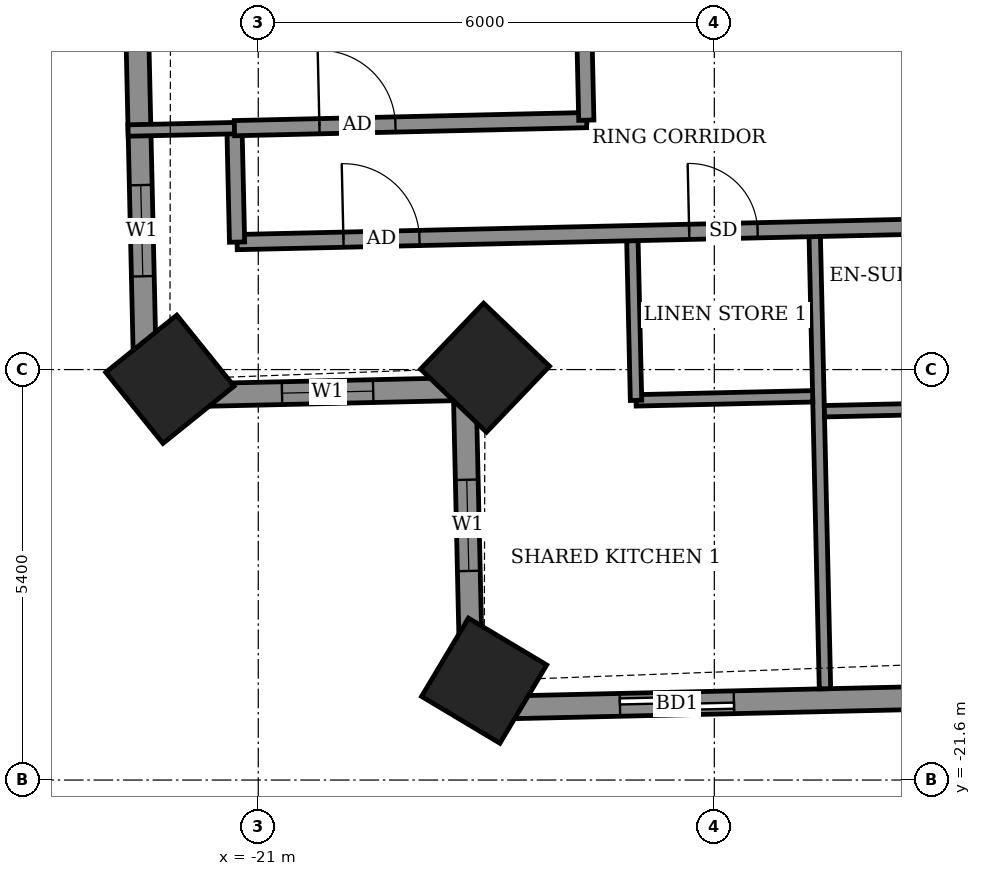
"""IFC4 building model, lengths in metres.
Left out: names, types, materials, properties, quantities, classifications, styles, units other than length and angle.
Written with IfcOpenShell. Run it as: python <this file> out.ifc"""

import sys

from ifc_helpers import new_model, si_unit, direction, frame, frame_2d, origin, origin_2d, place, context, subcontext, project, spatial, rectangle, extrude, element, fill, save


model = new_model("IFC4")
c1 = context("Model", 3, precision=1e-05, world=origin(), true_north=direction((0.0, 1.0)))
c2 = subcontext(c1, "Body", "Model", "MODEL_VIEW")
j1 = project(units=[si_unit("LENGTHUNIT", "METRE"), si_unit("PLANEANGLEUNIT", "RADIAN")], contexts=[c1])
p1 = place(None, origin())
s1 = spatial("IfcSite", under=j1, at=p1, CompositionType="ELEMENT")
p2 = place(p1, origin())
s2 = spatial("IfcBuilding", under=s1, at=p2, CompositionType="ELEMENT")
p3 = place(p2, frame((0.0, 0.0, 186.1)))
s3 = spatial("IfcBuildingStorey", under=s2, at=p3, CompositionType="ELEMENT", Elevation=186.1)
for number, where, z_axis, x_axis in (
    (1, (-22.163, -16.328, -0.55), (0.0, 0.0, 1.0), (0.627, -0.779, 0.0)),
    (2, (-18.016, -16.175, -0.55), (0.0, 0.0, 1.0), (0.723, -0.691, 0.0)),
    (3, (-18.028, -20.293, -0.55), (0.0, 0.0, 1.0), (0.858, -0.513, 0.0)),
):
    element("IfcColumn", number, at=place(p3, frame(where, z_axis=z_axis, x_axis=x_axis)), inside=s3, PredefinedType="COLUMN", context=c2, shape_type="SweptSolid", body=[
        extrude(rectangle(XDim=1.2, YDim=1.2, at=origin_2d()), origin(), (0.0, 0.0, 1.0), 3.6),
    ])
p4 = place(p3, frame((-22.729, -5.725, 0.0), z_axis=(0.0, 0.0, 1.0), x_axis=(0.022726014582, -0.999741730779, 0.0)))
e4 = element("IfcWall", 4, at=p4, inside=s3, PredefinedType="SOLIDWALL", context=c2, shape_type="SweptSolid", body=[
    extrude(rectangle(XDim=10.829, YDim=0.3, at=frame_2d((5.414, 0.0))), origin(), (0.0, 0.0, 1.0), 3.05),
])
p5 = place(p4, frame((1.592, 0.0, 0.0)))
e5 = element("IfcOpeningElement", 5, at=p5, cuts=e4, PredefinedType="OPENING", context=c2, shape_type="SweptSolid", body=[
    extrude(rectangle(XDim=1.5, YDim=2.4, at=frame_2d((0.75, 1.2))), frame((0.0, 0.16, 0.0), z_axis=(0.0, -1.0, 0.0), x_axis=(1.0, 0.0, 0.0)), (0.0, 0.0, 1.0), 0.32),
])
p6 = place(p4, frame((8.05, 0.0, 0.9)))
e6 = element("IfcOpeningElement", 6, at=p6, cuts=e4, PredefinedType="OPENING", context=c2, shape_type="SweptSolid", body=[
    extrude(rectangle(XDim=1.2, YDim=1.5, at=frame_2d((0.6, 0.75))), frame((0.0, 0.16, 0.0), z_axis=(0.0, -1.0, 0.0), x_axis=(1.0, 0.0, 0.0)), (0.0, 0.0, 1.0), 0.32),
])
p7 = place(p3, frame((-22.483, -16.551, 0.0), z_axis=(0.0, 0.0, 1.0), x_axis=(0.999744320311, 0.022611811187, 0.0)))
e7 = element("IfcWall", 7, at=p7, inside=s3, PredefinedType="SOLIDWALL", context=c2, shape_type="SweptSolid", body=[
    extrude(rectangle(XDim=4.2, YDim=0.3, at=frame_2d((2.1, 0.0))), origin(), (0.0, 0.0, 1.0), 2.55),
])
p8 = place(p7, frame((1.796, 0.0, 0.9)))
e8 = element("IfcOpeningElement", 8, at=p8, cuts=e7, PredefinedType="OPENING", context=c2, shape_type="SweptSolid", body=[
    extrude(rectangle(XDim=1.2, YDim=1.5, at=frame_2d((0.6, 0.75))), frame((0.0, 0.16, 0.0), z_axis=(0.0, -1.0, 0.0), x_axis=(1.0, 0.0, 0.0)), (0.0, 0.0, 1.0), 0.32),
])
p9 = place(p3, frame((-18.284, -16.456, 0.0), z_axis=(0.0, 0.0, 1.0), x_axis=(0.022611811187, -0.999744320311, 0.0)))
e9 = element("IfcWall", 9, at=p9, inside=s3, PredefinedType="SOLIDWALL", context=c2, shape_type="SweptSolid", body=[
    extrude(rectangle(XDim=4.2, YDim=0.3, at=frame_2d((2.1, 0.0))), origin(), (0.0, 0.0, 1.0), 2.55),
])
p10 = place(p9, frame((1.194, 0.0, 0.9)))
e10 = element("IfcOpeningElement", 10, at=p10, cuts=e9, PredefinedType="OPENING", context=c2, shape_type="SweptSolid", body=[
    extrude(rectangle(XDim=1.2, YDim=1.5, at=frame_2d((0.6, 0.75))), frame((0.0, 0.16, 0.0), z_axis=(0.0, -1.0, 0.0), x_axis=(1.0, 0.0, 0.0)), (0.0, 0.0, 1.0), 0.32),
])
p11 = place(p3, frame((-18.189, -20.655, 0.0), z_axis=(0.0, 0.0, 1.0), x_axis=(0.999742285265, 0.022701609063, 0.0)))
e11 = element("IfcWall", 11, at=p11, inside=s3, PredefinedType="SOLIDWALL", context=c2, shape_type="SweptSolid", body=[
    extrude(rectangle(XDim=39.78, YDim=0.3, at=frame_2d((19.89, 0.0))), origin(), (0.0, 0.0, 1.0), 3.05),
])
p12 = place(p11, frame((1.948, 0.0, 0.0)))
e12 = element("IfcOpeningElement", 12, at=p12, cuts=e11, PredefinedType="OPENING", context=c2, shape_type="SweptSolid", body=[
    extrude(rectangle(XDim=1.5, YDim=2.4, at=frame_2d((0.75, 1.2))), frame((0.0, 0.16, 0.0), z_axis=(0.0, -1.0, 0.0), x_axis=(1.0, 0.0, 0.0)), (0.0, 0.0, 1.0), 0.32),
])
p13 = place(p11, frame((7.24, 0.0, 0.0)))
e13 = element("IfcOpeningElement", 13, at=p13, cuts=e11, PredefinedType="OPENING", context=c2, shape_type="SweptSolid", body=[
    extrude(rectangle(XDim=1.5, YDim=2.4, at=frame_2d((0.75, 1.2))), frame((0.0, 0.16, 0.0), z_axis=(0.0, -1.0, 0.0), x_axis=(1.0, 0.0, 0.0)), (0.0, 0.0, 1.0), 0.32),
])
p14 = place(p11, frame((10.23, 0.0, 0.0)))
e14 = element("IfcOpeningElement", 14, at=p14, cuts=e11, PredefinedType="OPENING", context=c2, shape_type="SweptSolid", body=[
    extrude(rectangle(XDim=1.5, YDim=2.4, at=frame_2d((0.75, 1.2))), frame((0.0, 0.16, 0.0), z_axis=(0.0, -1.0, 0.0), x_axis=(1.0, 0.0, 0.0)), (0.0, 0.0, 1.0), 0.32),
])
p15 = place(p11, frame((14.955, 0.0, 0.0)))
e15 = element("IfcOpeningElement", 15, at=p15, cuts=e11, PredefinedType="OPENING", context=c2, shape_type="SweptSolid", body=[
    extrude(rectangle(XDim=1.5, YDim=2.4, at=frame_2d((0.75, 1.2))), frame((0.0, 0.16, 0.0), z_axis=(0.0, -1.0, 0.0), x_axis=(1.0, 0.0, 0.0)), (0.0, 0.0, 1.0), 0.32),
])
p16 = place(p11, frame((20.67, 0.0, 0.0)))
e16 = element("IfcOpeningElement", 16, at=p16, cuts=e11, PredefinedType="OPENING", context=c2, shape_type="SweptSolid", body=[
    extrude(rectangle(XDim=1.2, YDim=2.4, at=frame_2d((0.6, 1.2))), frame((0.0, 0.16, 0.0), z_axis=(0.0, -1.0, 0.0), x_axis=(1.0, 0.0, 0.0)), (0.0, 0.0, 1.0), 0.32),
])
p17 = place(p11, frame((23.51, 0.0, 0.0)))
e17 = element("IfcOpeningElement", 17, at=p17, cuts=e11, PredefinedType="OPENING", context=c2, shape_type="SweptSolid", body=[
    extrude(rectangle(XDim=1.5, YDim=2.4, at=frame_2d((0.75, 1.2))), frame((0.0, 0.16, 0.0), z_axis=(0.0, -1.0, 0.0), x_axis=(1.0, 0.0, 0.0)), (0.0, 0.0, 1.0), 0.32),
])
p18 = place(p11, frame((28.21, 0.0, 0.0)))
e18 = element("IfcOpeningElement", 18, at=p18, cuts=e11, PredefinedType="OPENING", context=c2, shape_type="SweptSolid", body=[
    extrude(rectangle(XDim=1.5, YDim=2.4, at=frame_2d((0.75, 1.2))), frame((0.0, 0.16, 0.0), z_axis=(0.0, -1.0, 0.0), x_axis=(1.0, 0.0, 0.0)), (0.0, 0.0, 1.0), 0.32),
])
p19 = place(p11, frame((31.35, 0.0, 0.0)))
e19 = element("IfcOpeningElement", 19, at=p19, cuts=e11, PredefinedType="OPENING", context=c2, shape_type="SweptSolid", body=[
    extrude(rectangle(XDim=1.2, YDim=2.4, at=frame_2d((0.6, 1.2))), frame((0.0, 0.16, 0.0), z_axis=(0.0, -1.0, 0.0), x_axis=(1.0, 0.0, 0.0)), (0.0, 0.0, 1.0), 0.32),
])
p20 = place(p11, frame((35.94, 0.0, 0.9)))
e20 = element("IfcOpeningElement", 20, at=p20, cuts=e11, PredefinedType="OPENING", context=c2, shape_type="SweptSolid", body=[
    extrude(rectangle(XDim=2.4, YDim=1.5, at=frame_2d((1.2, 0.75))), frame((0.0, 0.16, 0.0), z_axis=(0.0, -1.0, 0.0), x_axis=(1.0, 0.0, 0.0)), (0.0, 0.0, 1.0), 0.32),
])
p21 = place(p3, frame((-13.544, -20.399, 0.0), z_axis=(0.0, 0.0, 1.0), x_axis=(-0.022692509051, 0.999742491861, 0.0)))
e21 = element("IfcWall", 21, at=p21, inside=s3, PredefinedType="PARTITIONING", context=c2, shape_type="SweptSolid", body=[
    extrude(rectangle(XDim=5.949, YDim=0.15, at=frame_2d((2.975, 0.0))), origin(), (0.0, 0.0, 1.0), 2.55),
])
for number, where, z_axis, x_axis in (
    (22, (-13.551, -16.748, 0.0), (0.0, 0.0, 1.0), (1.0, 0.022, 0.0)),
    (23, (-16.03, -16.605, 0.0), (0.0, 0.0, 1.0), (1.0, 0.023, 0.0)),
):
    element("IfcWall", number, at=place(p3, frame(where, z_axis=z_axis, x_axis=x_axis)), inside=s3, PredefinedType="PARTITIONING", context=c2, shape_type="SweptSolid", body=[
        extrude(rectangle(XDim=2.324, YDim=0.15, at=frame_2d((1.162, 0.0))), origin(), (0.0, 0.0, 1.0), 3.05),
    ])
p22 = place(p3, frame((-16.03, -16.605, 0.0), z_axis=(0.0, 0.0, 1.0), x_axis=(-0.022779486249, 0.999740513837, 0.0)))
e24 = element("IfcWall", 24, at=p22, inside=s3, PredefinedType="PARTITIONING", context=c2, shape_type="SweptSolid", body=[
    extrude(rectangle(XDim=2.101, YDim=0.15, at=frame_2d((1.05, 0.0))), origin(), (0.0, 0.0, 1.0), 3.05),
])
p23 = place(p3, frame((-21.279, -14.523, 0.0), z_axis=(0.0, 0.0, 1.0), x_axis=(0.999742878501, 0.022675468818, 0.0)))
e25 = element("IfcWall", 25, at=p23, inside=s3, PredefinedType="PARTITIONING", context=c2, shape_type="SweptSolid", body=[
    extrude(rectangle(XDim=46.48, YDim=0.2, at=frame_2d((23.24, 0.0))), origin(), (0.0, 0.0, 1.0), 3.05),
])
p24 = place(p23, frame((1.4, 0.0, 0.0)))
e26 = element("IfcOpeningElement", 26, at=p24, cuts=e25, PredefinedType="OPENING", context=c2, shape_type="SweptSolid", body=[
    extrude(rectangle(XDim=1.0, YDim=2.1, at=frame_2d((0.5, 1.05))), frame((0.0, 0.11, 0.0), z_axis=(0.0, -1.0, 0.0), x_axis=(1.0, 0.0, 0.0)), (0.0, 0.0, 1.0), 0.22),
])
p25 = place(p23, frame((5.95, 0.0, 0.0)))
e27 = element("IfcOpeningElement", 27, at=p25, cuts=e25, PredefinedType="OPENING", context=c2, shape_type="SweptSolid", body=[
    extrude(rectangle(XDim=0.9, YDim=2.1, at=frame_2d((0.45, 1.05))), frame((0.0, 0.11, 0.0), z_axis=(0.0, -1.0, 0.0), x_axis=(1.0, 0.0, 0.0)), (0.0, 0.0, 1.0), 0.22),
])
p26 = place(p23, frame((10.575, 0.0, 0.0)))
e28 = element("IfcOpeningElement", 28, at=p26, cuts=e25, PredefinedType="OPENING", context=c2, shape_type="SweptSolid", body=[
    extrude(rectangle(XDim=0.9, YDim=2.1, at=frame_2d((0.45, 1.05))), frame((0.0, 0.11, 0.0), z_axis=(0.0, -1.0, 0.0), x_axis=(1.0, 0.0, 0.0)), (0.0, 0.0, 1.0), 0.22),
])
p27 = place(p23, frame((12.625, 0.0, 0.0)))
e29 = element("IfcOpeningElement", 29, at=p27, cuts=e25, PredefinedType="OPENING", context=c2, shape_type="SweptSolid", body=[
    extrude(rectangle(XDim=0.9, YDim=2.1, at=frame_2d((0.45, 1.05))), frame((0.0, 0.11, 0.0), z_axis=(0.0, -1.0, 0.0), x_axis=(1.0, 0.0, 0.0)), (0.0, 0.0, 1.0), 0.22),
])
p28 = place(p23, frame((19.4, 0.0, 0.0)))
e30 = element("IfcOpeningElement", 30, at=p28, cuts=e25, PredefinedType="OPENING", context=c2, shape_type="SweptSolid", body=[
    extrude(rectangle(XDim=0.9, YDim=2.1, at=frame_2d((0.45, 1.05))), frame((0.0, 0.11, 0.0), z_axis=(0.0, -1.0, 0.0), x_axis=(1.0, 0.0, 0.0)), (0.0, 0.0, 1.0), 0.22),
])
p29 = place(p23, frame((21.375, 0.0, 0.0)))
e31 = element("IfcOpeningElement", 31, at=p29, cuts=e25, PredefinedType="OPENING", context=c2, shape_type="SweptSolid", body=[
    extrude(rectangle(XDim=0.9, YDim=2.1, at=frame_2d((0.45, 1.05))), frame((0.0, 0.11, 0.0), z_axis=(0.0, -1.0, 0.0), x_axis=(1.0, 0.0, 0.0)), (0.0, 0.0, 1.0), 0.22),
])
p30 = place(p23, frame((28.15, 0.0, 0.0)))
e32 = element("IfcOpeningElement", 32, at=p30, cuts=e25, PredefinedType="OPENING", context=c2, shape_type="SweptSolid", body=[
    extrude(rectangle(XDim=0.9, YDim=2.1, at=frame_2d((0.45, 1.05))), frame((0.0, 0.11, 0.0), z_axis=(0.0, -1.0, 0.0), x_axis=(1.0, 0.0, 0.0)), (0.0, 0.0, 1.0), 0.22),
])
p31 = place(p23, frame((30.1, 0.0, 0.0)))
e33 = element("IfcOpeningElement", 33, at=p31, cuts=e25, PredefinedType="OPENING", context=c2, shape_type="SweptSolid", body=[
    extrude(rectangle(XDim=0.9, YDim=2.1, at=frame_2d((0.45, 1.05))), frame((0.0, 0.11, 0.0), z_axis=(0.0, -1.0, 0.0), x_axis=(1.0, 0.0, 0.0)), (0.0, 0.0, 1.0), 0.22),
])
p32 = place(p23, frame((36.875, 0.0, 0.0)))
e34 = element("IfcOpeningElement", 34, at=p32, cuts=e25, PredefinedType="OPENING", context=c2, shape_type="SweptSolid", body=[
    extrude(rectangle(XDim=0.9, YDim=2.1, at=frame_2d((0.45, 1.05))), frame((0.0, 0.11, 0.0), z_axis=(0.0, -1.0, 0.0), x_axis=(1.0, 0.0, 0.0)), (0.0, 0.0, 1.0), 0.22),
])
p33 = place(p23, frame((43.89, 0.0, 0.0)))
e35 = element("IfcOpeningElement", 35, at=p33, cuts=e25, PredefinedType="OPENING", context=c2, shape_type="SweptSolid", body=[
    extrude(rectangle(XDim=1.0, YDim=2.1, at=frame_2d((0.5, 1.05))), frame((0.0, 0.11, 0.0), z_axis=(0.0, -1.0, 0.0), x_axis=(1.0, 0.0, 0.0)), (0.0, 0.0, 1.0), 0.22),
])
p34 = place(p23, frame((39.05, 0.0, 0.0)))
e36 = element("IfcOpeningElement", 36, at=p34, cuts=e25, PredefinedType="OPENING", context=c2, shape_type="SweptSolid", body=[
    extrude(rectangle(XDim=0.9, YDim=2.1, at=frame_2d((0.45, 1.05))), frame((0.0, 0.11, 0.0), z_axis=(0.0, -1.0, 0.0), x_axis=(1.0, 0.0, 0.0)), (0.0, 0.0, 1.0), 0.22),
])
p35 = place(p3, frame((-21.279, -14.523, 0.0), z_axis=(0.0, 0.0, 1.0), x_axis=(-0.022632637625, 0.99974384905, 0.0)))
e37 = element("IfcWall", 37, at=p35, inside=s3, PredefinedType="PARTITIONING", context=c2, shape_type="SweptSolid", body=[
    extrude(rectangle(XDim=1.5, YDim=0.2, at=frame_2d((0.75, 0.0))), origin(), (0.0, 0.0, 1.0), 3.05),
])
p36 = place(p3, frame((-22.713, -13.055, 0.0), z_axis=(0.0, 0.0, 1.0), x_axis=(0.999756172383, 0.022081571112, 0.0)))
e38 = element("IfcWall", 38, at=p36, inside=s3, PredefinedType="PARTITIONING", context=c2, shape_type="SweptSolid", body=[
    extrude(rectangle(XDim=1.404, YDim=0.15, at=frame_2d((0.702, 0.0))), origin(), (0.0, 0.0, 1.0), 2.55),
])
p37 = place(p3, frame((-21.313, -13.024, 0.0), z_axis=(0.0, 0.0, 1.0), x_axis=(0.999738699021, 0.022858995594, 0.0)))
e39 = element("IfcWall", 39, at=p37, inside=s3, PredefinedType="PARTITIONING", context=c2, shape_type="SweptSolid", body=[
    extrude(rectangle(XDim=4.635, YDim=0.2, at=frame_2d((2.318, 0.0))), origin(), (0.0, 0.0, 1.0), 3.05),
])
p38 = place(p37, frame((1.118, 0.0, 0.0)))
e40 = element("IfcOpeningElement", 40, at=p38, cuts=e39, PredefinedType="OPENING", context=c2, shape_type="SweptSolid", body=[
    extrude(rectangle(XDim=1.0, YDim=2.1, at=frame_2d((0.5, 1.05))), frame((0.0, 0.11, 0.0), z_axis=(0.0, -1.0, 0.0), x_axis=(1.0, 0.0, 0.0)), (0.0, 0.0, 1.0), 0.22),
])
p39 = place(p3, frame((-16.684, -12.919, 0.0), z_axis=(0.0, 0.0, 1.0), x_axis=(-0.022694293906, 0.999742451346, 0.0)))
e41 = element("IfcWall", 41, at=p39, inside=s3, PredefinedType="PARTITIONING", context=c2, shape_type="SweptSolid", body=[
    extrude(rectangle(XDim=28.024, YDim=0.2, at=frame_2d((14.012, 0.0))), origin(), (0.0, 0.0, 1.0), 3.05),
])
p40 = place(p39, frame((22.825, 0.0, 0.0)))
e42 = element("IfcOpeningElement", 42, at=p40, cuts=e41, PredefinedType="OPENING", context=c2, shape_type="SweptSolid", body=[
    extrude(rectangle(XDim=1.0, YDim=2.1, at=frame_2d((0.5, 1.05))), frame((0.0, 0.11, 0.0), z_axis=(0.0, -1.0, 0.0), x_axis=(1.0, 0.0, 0.0)), (0.0, 0.0, 1.0), 0.22),
])
p41 = place(p39, frame((26.374, 0.0, 0.0)))
e43 = element("IfcOpeningElement", 43, at=p41, cuts=e41, PredefinedType="OPENING", context=c2, shape_type="SweptSolid", body=[
    extrude(rectangle(XDim=0.9, YDim=2.1, at=frame_2d((0.45, 1.05))), frame((0.0, 0.11, 0.0), z_axis=(0.0, -1.0, 0.0), x_axis=(1.0, 0.0, 0.0)), (0.0, 0.0, 1.0), 0.22),
])
p42 = place(p39, frame((16.7, 0.0, 0.0)))
e44 = element("IfcOpeningElement", 44, at=p42, cuts=e41, PredefinedType="OPENING", context=c2, shape_type="SweptSolid", body=[
    extrude(rectangle(XDim=1.0, YDim=2.1, at=frame_2d((0.5, 1.05))), frame((0.0, 0.11, 0.0), z_axis=(0.0, -1.0, 0.0), x_axis=(1.0, 0.0, 0.0)), (0.0, 0.0, 1.0), 0.22),
])
p43 = place(p39, frame((19.175, 0.0, 0.0)))
e45 = element("IfcOpeningElement", 45, at=p43, cuts=e41, PredefinedType="OPENING", context=c2, shape_type="SweptSolid", body=[
    extrude(rectangle(XDim=0.9, YDim=2.1, at=frame_2d((0.45, 1.05))), frame((0.0, 0.11, 0.0), z_axis=(0.0, -1.0, 0.0), x_axis=(1.0, 0.0, 0.0)), (0.0, 0.0, 1.0), 0.22),
])
p44 = place(p39, frame((14.725, 0.0, 0.0)))
e46 = element("IfcOpeningElement", 46, at=p44, cuts=e41, PredefinedType="OPENING", context=c2, shape_type="SweptSolid", body=[
    extrude(rectangle(XDim=1.0, YDim=2.1, at=frame_2d((0.5, 1.05))), frame((0.0, 0.11, 0.0), z_axis=(0.0, -1.0, 0.0), x_axis=(1.0, 0.0, 0.0)), (0.0, 0.0, 1.0), 0.22),
])
p45 = place(p39, frame((12.625, 0.0, 0.0)))
e47 = element("IfcOpeningElement", 47, at=p45, cuts=e41, PredefinedType="OPENING", context=c2, shape_type="SweptSolid", body=[
    extrude(rectangle(XDim=0.9, YDim=2.1, at=frame_2d((0.45, 1.05))), frame((0.0, 0.11, 0.0), z_axis=(0.0, -1.0, 0.0), x_axis=(1.0, 0.0, 0.0)), (0.0, 0.0, 1.0), 0.22),
])
p46 = place(p39, frame((10.375, 0.0, 0.0)))
e48 = element("IfcOpeningElement", 48, at=p46, cuts=e41, PredefinedType="OPENING", context=c2, shape_type="SweptSolid", body=[
    extrude(rectangle(XDim=1.0, YDim=2.1, at=frame_2d((0.5, 1.05))), frame((0.0, 0.11, 0.0), z_axis=(0.0, -1.0, 0.0), x_axis=(1.0, 0.0, 0.0)), (0.0, 0.0, 1.0), 0.22),
])
p47 = place(p39, frame((8.125, 0.0, 0.0)))
e49 = element("IfcOpeningElement", 49, at=p47, cuts=e41, PredefinedType="OPENING", context=c2, shape_type="SweptSolid", body=[
    extrude(rectangle(XDim=0.9, YDim=2.1, at=frame_2d((0.45, 1.05))), frame((0.0, 0.11, 0.0), z_axis=(0.0, -1.0, 0.0), x_axis=(1.0, 0.0, 0.0)), (0.0, 0.0, 1.0), 0.22),
])
p48 = place(p39, frame((3.462, 0.0, 0.0)))
e50 = element("IfcOpeningElement", 50, at=p48, cuts=e41, PredefinedType="OPENING", context=c2, shape_type="SweptSolid", body=[
    extrude(rectangle(XDim=1.0, YDim=2.1, at=frame_2d((0.5, 1.05))), frame((0.0, 0.11, 0.0), z_axis=(0.0, -1.0, 0.0), x_axis=(1.0, 0.0, 0.0)), (0.0, 0.0, 1.0), 0.22),
])
p49 = place(p39, frame((5.625, 0.0, 0.0)))
e51 = element("IfcOpeningElement", 51, at=p49, cuts=e41, PredefinedType="OPENING", context=c2, shape_type="SweptSolid", body=[
    extrude(rectangle(XDim=0.9, YDim=2.1, at=frame_2d((0.45, 1.05))), frame((0.0, 0.11, 0.0), z_axis=(0.0, -1.0, 0.0), x_axis=(1.0, 0.0, 0.0)), (0.0, 0.0, 1.0), 0.22),
])
p50 = place(p6, origin())
e52 = element("IfcWindow", 52, at=p50, inside=s3, PartitioningType="SINGLE_PANEL", PredefinedType="WINDOW", context=c2, shape_type="SweptSolid", body=[
    extrude(rectangle(XDim=1.2, YDim=1.5, at=frame_2d((0.6, 0.75))), frame((0.0, 0.03, 0.0), z_axis=(0.0, -1.0, 0.0), x_axis=(1.0, 0.0, 0.0)), (0.0, 0.0, 1.0), 0.06),
])
fill(e6, e52)
p51 = place(p8, origin())
e53 = element("IfcWindow", 53, at=p51, inside=s3, PartitioningType="SINGLE_PANEL", PredefinedType="WINDOW", context=c2, shape_type="SweptSolid", body=[
    extrude(rectangle(XDim=1.2, YDim=1.5, at=frame_2d((0.6, 0.75))), frame((0.0, 0.03, 0.0), z_axis=(0.0, -1.0, 0.0), x_axis=(1.0, 0.0, 0.0)), (0.0, 0.0, 1.0), 0.06),
])
fill(e8, e53)
p52 = place(p10, origin())
e54 = element("IfcWindow", 54, at=p52, inside=s3, PartitioningType="SINGLE_PANEL", PredefinedType="WINDOW", context=c2, shape_type="SweptSolid", body=[
    extrude(rectangle(XDim=1.2, YDim=1.5, at=frame_2d((0.6, 0.75))), frame((0.0, 0.03, 0.0), z_axis=(0.0, -1.0, 0.0), x_axis=(1.0, 0.0, 0.0)), (0.0, 0.0, 1.0), 0.06),
])
fill(e10, e54)
p53 = place(p12, origin())
e55 = element("IfcDoor", 55, at=p53, inside=s3, OperationType="SLIDING_TO_LEFT", PredefinedType="DOOR", context=c2, shape_type="SweptSolid", body=[
    extrude(rectangle(XDim=1.5, YDim=2.4, at=frame_2d((0.75, 1.2))), frame((0.0, 0.025, 0.0), z_axis=(0.0, -1.0, 0.0), x_axis=(1.0, 0.0, 0.0)), (0.0, 0.0, 1.0), 0.05),
])
fill(e12, e55)
p54 = place(p24, origin())
e56 = element("IfcDoor", 56, at=p54, inside=s3, OperationType="SINGLE_SWING_LEFT", PredefinedType="DOOR", context=c2, shape_type="SweptSolid", body=[
    extrude(rectangle(XDim=1.0, YDim=2.1, at=frame_2d((0.5, 1.05))), frame((0.0, 0.025, 0.0), z_axis=(0.0, -1.0, 0.0), x_axis=(1.0, 0.0, 0.0)), (0.0, 0.0, 1.0), 0.05),
])
fill(e26, e56)
p55 = place(p25, origin())
e57 = element("IfcDoor", 57, at=p55, inside=s3, OperationType="SINGLE_SWING_LEFT", PredefinedType="DOOR", context=c2, shape_type="SweptSolid", body=[
    extrude(rectangle(XDim=0.9, YDim=2.1, at=frame_2d((0.45, 1.05))), frame((0.0, 0.025, 0.0), z_axis=(0.0, -1.0, 0.0), x_axis=(1.0, 0.0, 0.0)), (0.0, 0.0, 1.0), 0.05),
])
fill(e27, e57)
p56 = place(p38, origin())
e58 = element("IfcDoor", 58, at=p56, inside=s3, OperationType="SINGLE_SWING_LEFT", PredefinedType="DOOR", context=c2, shape_type="SweptSolid", body=[
    extrude(rectangle(XDim=1.0, YDim=2.1, at=frame_2d((0.5, 1.05))), frame((0.0, 0.025, 0.0), z_axis=(0.0, -1.0, 0.0), x_axis=(1.0, 0.0, 0.0)), (0.0, 0.0, 1.0), 0.05),
])
fill(e40, e58)
save(model, sys.argv[1])
